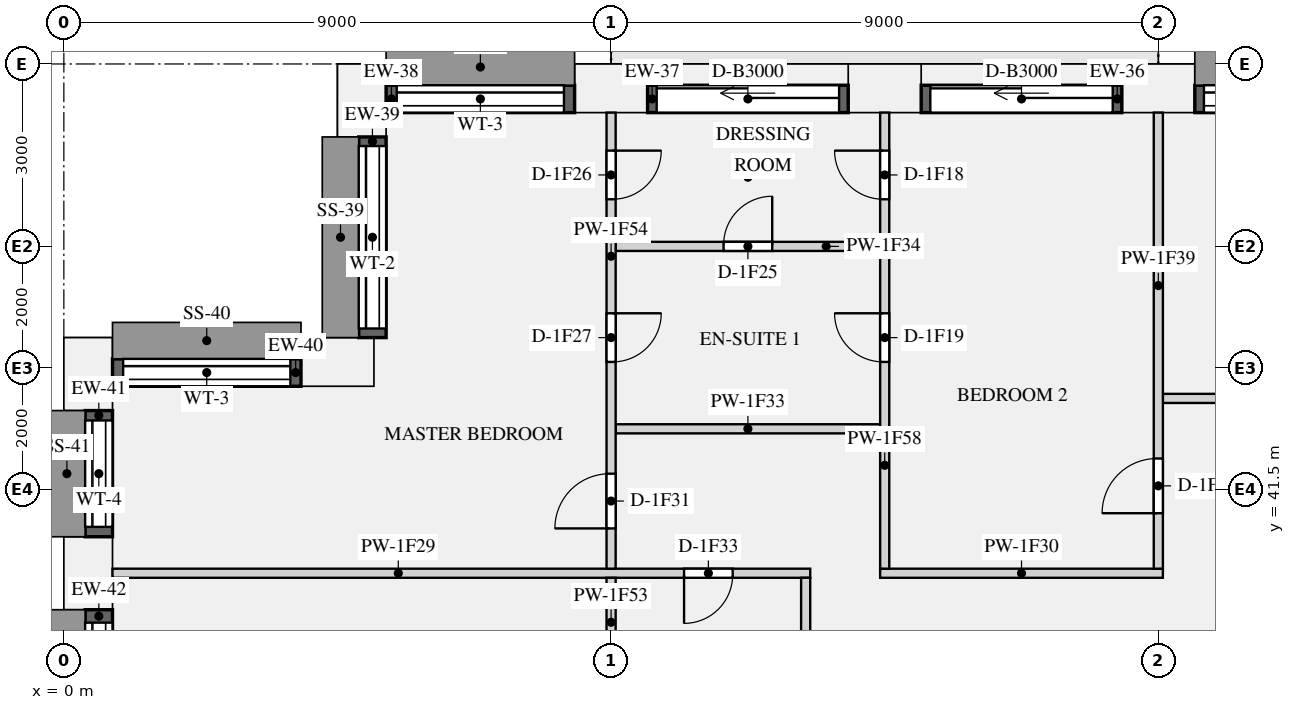
"""IFC4 building model, lengths in metres.
Left out: names, types, materials, properties, quantities, classifications, styles, units other than length and angle.
Written with IfcOpenShell. Run it as: python <this file> out.ifc"""

import sys

from ifc_helpers import new_model, si_unit, direction, frame, frame_2d, origin, origin_2d, place, context, subcontext, project, spatial, rectangle, extrude, element, fill, save


model = new_model("IFC4")
c1 = context("Model", 3, precision=1e-05, world=origin(), true_north=direction((0.0, 1.0)))
c2 = subcontext(c1, "Body", "Model", "MODEL_VIEW")
j1 = project(units=[si_unit("LENGTHUNIT", "METRE"), si_unit("PLANEANGLEUNIT", "RADIAN")], contexts=[c1])
p1 = place(None, origin())
s1 = spatial("IfcSite", under=j1, at=p1, CompositionType="ELEMENT")
p2 = place(p1, origin())
s2 = spatial("IfcBuilding", under=s1, at=p2, CompositionType="ELEMENT")
p3 = place(p2, frame((0.0, 0.0, 60.45)))
s3 = spatial("IfcBuildingStorey", under=s2, at=p3, CompositionType="ELEMENT", Elevation=60.45)
for number, where, z_axis, x_axis in (
    (1, (18.0, 48.1, 0.0), (0.0, 0.0, 1.0), (-1.0, 0.0, 0.0)),
    (2, (13.5, 48.1, 0.0), (0.0, 0.0, 1.0), (-1.0, 0.0, 0.0)),
    (3, (9.0, 48.1, 0.0), (0.0, 0.0, 1.0), (-1.0, 0.0, 0.0)),
    (4, (4.9, 47.9, 0.0), (0.0, 0.0, 1.0), (0.0, -1.0, 0.0)),
    (5, (4.5, 43.6, 0.0), (0.0, 0.0, 1.0), (-1.0, 0.0, 0.0)),
    (6, (0.4, 43.4, 0.0), (0.0, 0.0, 1.0), (0.0, -1.0, 0.0)),
    (7, (0.4, 40.125, 0.0), (0.0, 0.0, 1.0), (0.0, -1.0, 0.0)),
):
    element("IfcColumn", number, at=place(p3, frame(where, z_axis=z_axis, x_axis=x_axis)), inside=s3, PredefinedType="USERDEFINED", context=c2, shape_type="SweptSolid", body=[
        extrude(rectangle(XDim=1.2, YDim=0.8, at=origin_2d()), origin(), (0.0, 0.0, 1.0), 3.15),
    ])
p4 = place(p3, frame((21.9, 47.925, 0.9), z_axis=(0.0, 0.0, 1.0), x_axis=(-1.0, 0.0, 0.0)))
e8 = element("IfcWall", 8, at=p4, inside=s3, PredefinedType="SOLIDWALL", context=c2, shape_type="SweptSolid", body=[
    extrude(rectangle(XDim=3.3, YDim=0.45, at=frame_2d((1.65, 0.0))), origin(), (0.0, 0.0, 1.0), 1.93),
])
p5 = place(p4, frame((0.15, 0.0, 0.15)))
e9 = element("IfcOpeningElement", 9, at=p5, cuts=e8, PredefinedType="OPENING", context=c2, shape_type="SweptSolid", body=[
    extrude(rectangle(XDim=3.0, YDim=1.5, at=frame_2d((1.5, 0.75))), frame((0.0, 0.235, 0.0), z_axis=(0.0, -1.0, 0.0), x_axis=(1.0, 0.0, 0.0)), (0.0, 0.0, 1.0), 0.47),
])
p6 = place(p3, frame((17.4, 47.925, 0.0), z_axis=(0.0, 0.0, 1.0), x_axis=(-1.0, 0.0, 0.0)))
e10 = element("IfcWall", 10, at=p6, inside=s3, PredefinedType="SOLIDWALL", context=c2, shape_type="SweptSolid", body=[
    extrude(rectangle(XDim=3.3, YDim=0.45, at=frame_2d((1.65, 0.0))), origin(), (0.0, 0.0, 1.0), 2.83),
])
p7 = place(p6, frame((0.15, 0.0, 0.0)))
e11 = element("IfcOpeningElement", 11, at=p7, cuts=e10, PredefinedType="OPENING", context=c2, shape_type="SweptSolid", body=[
    extrude(rectangle(XDim=3.0, YDim=2.3, at=frame_2d((1.5, 1.15))), frame((0.0, 0.235, 0.0), z_axis=(0.0, -1.0, 0.0), x_axis=(1.0, 0.0, 0.0)), (0.0, 0.0, 1.0), 0.47),
])
p8 = place(p3, frame((12.9, 47.925, 0.0), z_axis=(0.0, 0.0, 1.0), x_axis=(-1.0, 0.0, 0.0)))
e12 = element("IfcWall", 12, at=p8, inside=s3, PredefinedType="SOLIDWALL", context=c2, shape_type="SweptSolid", body=[
    extrude(rectangle(XDim=3.3, YDim=0.45, at=frame_2d((1.65, 0.0))), origin(), (0.0, 0.0, 1.0), 2.83),
])
p9 = place(p8, frame((0.15, 0.0, 0.0)))
e13 = element("IfcOpeningElement", 13, at=p9, cuts=e12, PredefinedType="OPENING", context=c2, shape_type="SweptSolid", body=[
    extrude(rectangle(XDim=3.0, YDim=2.3, at=frame_2d((1.5, 1.15))), frame((0.0, 0.235, 0.0), z_axis=(0.0, -1.0, 0.0), x_axis=(1.0, 0.0, 0.0)), (0.0, 0.0, 1.0), 0.47),
])
p10 = place(p3, frame((8.4, 47.925, 0.9), z_axis=(0.0, 0.0, 1.0), x_axis=(-1.0, 0.0, 0.0)))
e14 = element("IfcWall", 14, at=p10, inside=s3, PredefinedType="SOLIDWALL", context=c2, shape_type="SweptSolid", body=[
    extrude(rectangle(XDim=3.1, YDim=0.45, at=frame_2d((1.55, 0.0))), origin(), (0.0, 0.0, 1.0), 1.93),
])
p11 = place(p10, frame((0.175, 0.0, 0.15)))
e15 = element("IfcOpeningElement", 15, at=p11, cuts=e14, PredefinedType="OPENING", context=c2, shape_type="SweptSolid", body=[
    extrude(rectangle(XDim=2.75, YDim=1.5, at=frame_2d((1.375, 0.75))), frame((0.0, 0.235, 0.0), z_axis=(0.0, -1.0, 0.0), x_axis=(1.0, 0.0, 0.0)), (0.0, 0.0, 1.0), 0.47),
])
p12 = place(p3, frame((5.075, 47.3, 0.9), z_axis=(0.0, 0.0, 1.0), x_axis=(0.0, -1.0, 0.0)))
e16 = element("IfcWall", 16, at=p12, inside=s3, PredefinedType="SOLIDWALL", context=c2, shape_type="SweptSolid", body=[
    extrude(rectangle(XDim=3.3, YDim=0.45, at=frame_2d((1.65, 0.0))), origin(), (0.0, 0.0, 1.0), 1.93),
])
p13 = place(p12, frame((0.15, 0.0, 0.15)))
e17 = element("IfcOpeningElement", 17, at=p13, cuts=e16, PredefinedType="OPENING", context=c2, shape_type="SweptSolid", body=[
    extrude(rectangle(XDim=3.0, YDim=1.5, at=frame_2d((1.5, 0.75))), frame((0.0, 0.235, 0.0), z_axis=(0.0, -1.0, 0.0), x_axis=(1.0, 0.0, 0.0)), (0.0, 0.0, 1.0), 0.47),
])
p14 = place(p3, frame((3.9, 43.425, 0.9), z_axis=(0.0, 0.0, 1.0), x_axis=(-1.0, 0.0, 0.0)))
e18 = element("IfcWall", 18, at=p14, inside=s3, PredefinedType="SOLIDWALL", context=c2, shape_type="SweptSolid", body=[
    extrude(rectangle(XDim=3.1, YDim=0.45, at=frame_2d((1.55, 0.0))), origin(), (0.0, 0.0, 1.0), 1.93),
])
p15 = place(p14, frame((0.175, 0.0, 0.15)))
e19 = element("IfcOpeningElement", 19, at=p15, cuts=e18, PredefinedType="OPENING", context=c2, shape_type="SweptSolid", body=[
    extrude(rectangle(XDim=2.75, YDim=1.5, at=frame_2d((1.375, 0.75))), frame((0.0, 0.235, 0.0), z_axis=(0.0, -1.0, 0.0), x_axis=(1.0, 0.0, 0.0)), (0.0, 0.0, 1.0), 0.47),
])
p16 = place(p3, frame((0.575, 42.8, 0.9), z_axis=(0.0, 0.0, 1.0), x_axis=(0.0, -1.0, 0.0)))
e20 = element("IfcWall", 20, at=p16, inside=s3, PredefinedType="SOLIDWALL", context=c2, shape_type="SweptSolid", body=[
    extrude(rectangle(XDim=2.075, YDim=0.45, at=frame_2d((1.038, 0.0))), origin(), (0.0, 0.0, 1.0), 1.93),
])
p17 = place(p16, frame((0.163, 0.0, 0.15)))
e21 = element("IfcOpeningElement", 21, at=p17, cuts=e20, PredefinedType="OPENING", context=c2, shape_type="SweptSolid", body=[
    extrude(rectangle(XDim=1.75, YDim=1.5, at=frame_2d((0.875, 0.75))), frame((0.0, 0.235, 0.0), z_axis=(0.0, -1.0, 0.0), x_axis=(1.0, 0.0, 0.0)), (0.0, 0.0, 1.0), 0.47),
])
p18 = place(p3, frame((0.575, 39.525, 0.9), z_axis=(0.0, 0.0, 1.0), x_axis=(0.0, -1.0, 0.0)))
e22 = element("IfcWall", 22, at=p18, inside=s3, PredefinedType="SOLIDWALL", context=c2, shape_type="SweptSolid", body=[
    extrude(rectangle(XDim=2.675, YDim=0.45, at=frame_2d((1.337, 0.0))), origin(), (0.0, 0.0, 1.0), 1.93),
])
p19 = place(p18, frame((0.212, 0.0, 0.15)))
e23 = element("IfcOpeningElement", 23, at=p19, cuts=e22, PredefinedType="OPENING", context=c2, shape_type="SweptSolid", body=[
    extrude(rectangle(XDim=2.25, YDim=1.5, at=frame_2d((1.125, 0.75))), frame((0.0, 0.235, 0.0), z_axis=(0.0, -1.0, 0.0), x_axis=(1.0, 0.0, 0.0)), (0.0, 0.0, 1.0), 0.47),
])
p20 = place(p3, frame((18.075, 43.0, 0.0), z_axis=(0.0, 0.0, 1.0), x_axis=(1.0, 0.0, 0.0)))
e24 = element("IfcWall", 24, at=p20, inside=s3, PredefinedType="PARTITIONING", context=c2, shape_type="SweptSolid", body=[
    extrude(rectangle(XDim=22.325, YDim=0.15, at=frame_2d((11.163, 0.0))), origin(), (0.0, 0.0, 1.0), 2.83),
])
p21 = place(p20, frame((17.175, 0.0, 0.0)))
e25 = element("IfcOpeningElement", 25, at=p21, cuts=e24, PredefinedType="OPENING", context=c2, shape_type="SweptSolid", body=[
    extrude(rectangle(XDim=1.5, YDim=2.1, at=frame_2d((0.75, 1.05))), frame((0.0, 0.085, 0.0), z_axis=(0.0, -1.0, 0.0), x_axis=(1.0, 0.0, 0.0)), (0.0, 0.0, 1.0), 0.17),
])
p22 = place(p20, frame((11.475, 0.0, 0.0)))
e26 = element("IfcOpeningElement", 26, at=p22, cuts=e24, PredefinedType="OPENING", context=c2, shape_type="SweptSolid", body=[
    extrude(rectangle(XDim=0.9, YDim=2.1, at=frame_2d((0.45, 1.05))), frame((0.0, 0.085, 0.0), z_axis=(0.0, -1.0, 0.0), x_axis=(1.0, 0.0, 0.0)), (0.0, 0.0, 1.0), 0.17),
])
p23 = place(p20, frame((2.475, 0.0, 0.0)))
e27 = element("IfcOpeningElement", 27, at=p23, cuts=e24, PredefinedType="OPENING", context=c2, shape_type="SweptSolid", body=[
    extrude(rectangle(XDim=0.9, YDim=2.1, at=frame_2d((0.45, 1.05))), frame((0.0, 0.085, 0.0), z_axis=(0.0, -1.0, 0.0), x_axis=(1.0, 0.0, 0.0)), (0.0, 0.0, 1.0), 0.17),
])
p24 = place(p3, frame((0.8, 40.125, 0.0), z_axis=(0.0, 0.0, 1.0), x_axis=(1.0, 0.0, 0.0)))
e28 = element("IfcWall", 28, at=p24, inside=s3, PredefinedType="PARTITIONING", context=c2, shape_type="SweptSolid", body=[
    extrude(rectangle(XDim=11.475, YDim=0.15, at=frame_2d((5.737, 0.0))), origin(), (0.0, 0.0, 1.0), 2.83),
])
p25 = place(p24, frame((9.4, 0.0, 0.0)))
e29 = element("IfcOpeningElement", 29, at=p25, cuts=e28, PredefinedType="OPENING", context=c2, shape_type="SweptSolid", body=[
    extrude(rectangle(XDim=0.8, YDim=2.1, at=frame_2d((0.4, 1.05))), frame((0.0, 0.085, 0.0), z_axis=(0.0, -1.0, 0.0), x_axis=(1.0, 0.0, 0.0)), (0.0, 0.0, 1.0), 0.17),
])
p26 = place(p3, frame((13.425, 40.125, 0.0), z_axis=(0.0, 0.0, 1.0), x_axis=(1.0, 0.0, 0.0)))
e30 = element("IfcWall", 30, at=p26, inside=s3, PredefinedType="PARTITIONING", context=c2, shape_type="SweptSolid", body=[
    extrude(rectangle(XDim=4.65, YDim=0.15, at=frame_2d((2.325, 0.0))), origin(), (0.0, 0.0, 1.0), 2.83),
])
p27 = place(p3, frame((9.075, 42.5, 0.0), z_axis=(0.0, 0.0, 1.0), x_axis=(1.0, 0.0, 0.0)))
e31 = element("IfcWall", 31, at=p27, inside=s3, PredefinedType="PARTITIONING", context=c2, shape_type="SweptSolid", body=[
    extrude(rectangle(XDim=4.35, YDim=0.15, at=frame_2d((2.175, 0.0))), origin(), (0.0, 0.0, 1.0), 2.83),
])
p28 = place(p3, frame((9.075, 45.5, 0.0), z_axis=(0.0, 0.0, 1.0), x_axis=(1.0, 0.0, 0.0)))
e32 = element("IfcWall", 32, at=p28, inside=s3, PredefinedType="PARTITIONING", context=c2, shape_type="SweptSolid", body=[
    extrude(rectangle(XDim=4.35, YDim=0.15, at=frame_2d((2.175, 0.0))), origin(), (0.0, 0.0, 1.0), 2.83),
])
p29 = place(p28, frame((1.775, 0.0, 0.0)))
e33 = element("IfcOpeningElement", 33, at=p29, cuts=e32, PredefinedType="OPENING", context=c2, shape_type="SweptSolid", body=[
    extrude(rectangle(XDim=0.8, YDim=2.1, at=frame_2d((0.4, 1.05))), frame((0.0, 0.085, 0.0), z_axis=(0.0, -1.0, 0.0), x_axis=(1.0, 0.0, 0.0)), (0.0, 0.0, 1.0), 0.17),
])
p30 = place(p3, frame((18.0, 40.2, 0.0), z_axis=(0.0, 0.0, 1.0), x_axis=(0.0, 1.0, 0.0)))
e34 = element("IfcWall", 34, at=p30, inside=s3, PredefinedType="PARTITIONING", context=c2, shape_type="SweptSolid", body=[
    extrude(rectangle(XDim=7.5, YDim=0.15, at=frame_2d((3.75, 0.0))), origin(), (0.0, 0.0, 1.0), 2.83),
])
p31 = place(p30, frame((0.912, 0.0, 0.0)))
e35 = element("IfcOpeningElement", 35, at=p31, cuts=e34, PredefinedType="OPENING", context=c2, shape_type="SweptSolid", body=[
    extrude(rectangle(XDim=0.9, YDim=2.1, at=frame_2d((0.45, 1.05))), frame((0.0, 0.085, 0.0), z_axis=(0.0, -1.0, 0.0), x_axis=(1.0, 0.0, 0.0)), (0.0, 0.0, 1.0), 0.17),
])
p32 = place(p3, frame((9.0, 36.35, 0.0), z_axis=(0.0, 0.0, 1.0), x_axis=(0.0, 1.0, 0.0)))
e36 = element("IfcWall", 36, at=p32, inside=s3, PredefinedType="PARTITIONING", context=c2, shape_type="SweptSolid", body=[
    extrude(rectangle(XDim=3.7, YDim=0.15, at=frame_2d((1.85, 0.0))), origin(), (0.0, 0.0, 1.0), 2.83),
])
p33 = place(p32, frame((1.438, 0.0, 0.0)))
e37 = element("IfcOpeningElement", 37, at=p33, cuts=e36, PredefinedType="OPENING", context=c2, shape_type="SweptSolid", body=[
    extrude(rectangle(XDim=0.8, YDim=2.1, at=frame_2d((0.4, 1.05))), frame((0.0, 0.085, 0.0), z_axis=(0.0, -1.0, 0.0), x_axis=(1.0, 0.0, 0.0)), (0.0, 0.0, 1.0), 0.17),
])
p34 = place(p3, frame((9.0, 40.2, 0.0), z_axis=(0.0, 0.0, 1.0), x_axis=(0.0, 1.0, 0.0)))
e38 = element("IfcWall", 38, at=p34, inside=s3, PredefinedType="PARTITIONING", context=c2, shape_type="SweptSolid", body=[
    extrude(rectangle(XDim=7.5, YDim=0.15, at=frame_2d((3.75, 0.0))), origin(), (0.0, 0.0, 1.0), 2.83),
])
p35 = place(p34, frame((6.075, 0.0, 0.0)))
e39 = element("IfcOpeningElement", 39, at=p35, cuts=e38, PredefinedType="OPENING", context=c2, shape_type="SweptSolid", body=[
    extrude(rectangle(XDim=0.8, YDim=2.1, at=frame_2d((0.4, 1.05))), frame((0.0, 0.085, 0.0), z_axis=(0.0, -1.0, 0.0), x_axis=(1.0, 0.0, 0.0)), (0.0, 0.0, 1.0), 0.17),
])
p36 = place(p34, frame((3.4, 0.0, 0.0)))
e40 = element("IfcOpeningElement", 40, at=p36, cuts=e38, PredefinedType="OPENING", context=c2, shape_type="SweptSolid", body=[
    extrude(rectangle(XDim=0.8, YDim=2.1, at=frame_2d((0.4, 1.05))), frame((0.0, 0.085, 0.0), z_axis=(0.0, -1.0, 0.0), x_axis=(1.0, 0.0, 0.0)), (0.0, 0.0, 1.0), 0.17),
])
p37 = place(p34, frame((0.662, 0.0, 0.0)))
e41 = element("IfcOpeningElement", 41, at=p37, cuts=e38, PredefinedType="OPENING", context=c2, shape_type="SweptSolid", body=[
    extrude(rectangle(XDim=0.9, YDim=2.1, at=frame_2d((0.45, 1.05))), frame((0.0, 0.085, 0.0), z_axis=(0.0, -1.0, 0.0), x_axis=(1.0, 0.0, 0.0)), (0.0, 0.0, 1.0), 0.17),
])
p38 = place(p3, frame((13.5, 40.2, 0.0), z_axis=(0.0, 0.0, 1.0), x_axis=(0.0, 1.0, 0.0)))
e42 = element("IfcWall", 42, at=p38, inside=s3, PredefinedType="PARTITIONING", context=c2, shape_type="SweptSolid", body=[
    extrude(rectangle(XDim=7.5, YDim=0.15, at=frame_2d((3.75, 0.0))), origin(), (0.0, 0.0, 1.0), 2.83),
])
p39 = place(p38, frame((6.075, 0.0, 0.0)))
e43 = element("IfcOpeningElement", 43, at=p39, cuts=e42, PredefinedType="OPENING", context=c2, shape_type="SweptSolid", body=[
    extrude(rectangle(XDim=0.8, YDim=2.1, at=frame_2d((0.4, 1.05))), frame((0.0, 0.085, 0.0), z_axis=(0.0, -1.0, 0.0), x_axis=(1.0, 0.0, 0.0)), (0.0, 0.0, 1.0), 0.17),
])
p40 = place(p38, frame((3.4, 0.0, 0.0)))
e44 = element("IfcOpeningElement", 44, at=p40, cuts=e42, PredefinedType="OPENING", context=c2, shape_type="SweptSolid", body=[
    extrude(rectangle(XDim=0.8, YDim=2.1, at=frame_2d((0.4, 1.05))), frame((0.0, 0.085, 0.0), z_axis=(0.0, -1.0, 0.0), x_axis=(1.0, 0.0, 0.0)), (0.0, 0.0, 1.0), 0.17),
])
p41 = place(p3, frame((12.2, 36.35, 0.0), z_axis=(0.0, 0.0, 1.0), x_axis=(0.0, 1.0, 0.0)))
e45 = element("IfcWall", 45, at=p41, inside=s3, PredefinedType="PARTITIONING", context=c2, shape_type="SweptSolid", body=[
    extrude(rectangle(XDim=3.7, YDim=0.15, at=frame_2d((1.85, 0.0))), origin(), (0.0, 0.0, 1.0), 2.83),
])
p42 = place(p5, origin())
e46 = element("IfcWindow", 46, at=p42, inside=s3, PartitioningType="SINGLE_PANEL", PredefinedType="WINDOW", context=c2, shape_type="SweptSolid", body=[
    extrude(rectangle(XDim=3.0, YDim=1.5, at=frame_2d((1.5, 0.75))), frame((0.0, -0.065, 0.0), z_axis=(0.0, -1.0, 0.0), x_axis=(1.0, 0.0, 0.0)), (0.0, 0.0, 1.0), 0.06),
])
fill(e9, e46)
p43 = place(p7, origin())
e47 = element("IfcDoor", 47, at=p43, inside=s3, OperationType="SLIDING_TO_LEFT", PredefinedType="DOOR", context=c2, shape_type="SweptSolid", body=[
    extrude(rectangle(XDim=3.0, YDim=2.3, at=frame_2d((1.5, 1.15))), frame((0.0, -0.07, 0.0), z_axis=(0.0, -1.0, 0.0), x_axis=(1.0, 0.0, 0.0)), (0.0, 0.0, 1.0), 0.05),
])
fill(e11, e47)
p44 = place(p9, origin())
e48 = element("IfcDoor", 48, at=p44, inside=s3, OperationType="SLIDING_TO_LEFT", PredefinedType="DOOR", context=c2, shape_type="SweptSolid", body=[
    extrude(rectangle(XDim=3.0, YDim=2.3, at=frame_2d((1.5, 1.15))), frame((0.0, -0.07, 0.0), z_axis=(0.0, -1.0, 0.0), x_axis=(1.0, 0.0, 0.0)), (0.0, 0.0, 1.0), 0.05),
])
fill(e13, e48)
p45 = place(p11, origin())
e49 = element("IfcWindow", 49, at=p45, inside=s3, PartitioningType="SINGLE_PANEL", PredefinedType="WINDOW", context=c2, shape_type="SweptSolid", body=[
    extrude(rectangle(XDim=2.75, YDim=1.5, at=frame_2d((1.375, 0.75))), frame((0.0, -0.065, 0.0), z_axis=(0.0, -1.0, 0.0), x_axis=(1.0, 0.0, 0.0)), (0.0, 0.0, 1.0), 0.06),
])
fill(e15, e49)
p46 = place(p13, origin())
e50 = element("IfcWindow", 50, at=p46, inside=s3, PartitioningType="SINGLE_PANEL", PredefinedType="WINDOW", context=c2, shape_type="SweptSolid", body=[
    extrude(rectangle(XDim=3.0, YDim=1.5, at=frame_2d((1.5, 0.75))), frame((0.0, -0.065, 0.0), z_axis=(0.0, -1.0, 0.0), x_axis=(1.0, 0.0, 0.0)), (0.0, 0.0, 1.0), 0.06),
])
fill(e17, e50)
p47 = place(p15, origin())
e51 = element("IfcWindow", 51, at=p47, inside=s3, PartitioningType="SINGLE_PANEL", PredefinedType="WINDOW", context=c2, shape_type="SweptSolid", body=[
    extrude(rectangle(XDim=2.75, YDim=1.5, at=frame_2d((1.375, 0.75))), frame((0.0, -0.065, 0.0), z_axis=(0.0, -1.0, 0.0), x_axis=(1.0, 0.0, 0.0)), (0.0, 0.0, 1.0), 0.06),
])
fill(e19, e51)
p48 = place(p17, origin())
e52 = element("IfcWindow", 52, at=p48, inside=s3, PartitioningType="SINGLE_PANEL", PredefinedType="WINDOW", context=c2, shape_type="SweptSolid", body=[
    extrude(rectangle(XDim=1.75, YDim=1.5, at=frame_2d((0.875, 0.75))), frame((0.0, -0.065, 0.0), z_axis=(0.0, -1.0, 0.0), x_axis=(1.0, 0.0, 0.0)), (0.0, 0.0, 1.0), 0.06),
])
fill(e21, e52)
p49 = place(p19, origin())
e53 = element("IfcWindow", 53, at=p49, inside=s3, PartitioningType="SINGLE_PANEL", PredefinedType="WINDOW", context=c2, shape_type="SweptSolid", body=[
    extrude(rectangle(XDim=2.25, YDim=1.5, at=frame_2d((1.125, 0.75))), frame((0.0, -0.065, 0.0), z_axis=(0.0, -1.0, 0.0), x_axis=(1.0, 0.0, 0.0)), (0.0, 0.0, 1.0), 0.06),
])
fill(e23, e53)
p50 = place(p39, origin())
e54 = element("IfcDoor", 54, at=p50, inside=s3, OperationType="SINGLE_SWING_RIGHT", PredefinedType="DOOR", context=c2, shape_type="SweptSolid", body=[
    extrude(rectangle(XDim=0.8, YDim=2.1, at=frame_2d((0.4, 1.05))), frame((0.0, 0.025, 0.0), z_axis=(0.0, -1.0, 0.0), x_axis=(1.0, 0.0, 0.0)), (0.0, 0.0, 1.0), 0.05),
])
fill(e43, e54)
p51 = place(p40, origin())
e55 = element("IfcDoor", 55, at=p51, inside=s3, OperationType="SINGLE_SWING_RIGHT", PredefinedType="DOOR", context=c2, shape_type="SweptSolid", body=[
    extrude(rectangle(XDim=0.8, YDim=2.1, at=frame_2d((0.4, 1.05))), frame((0.0, 0.025, 0.0), z_axis=(0.0, -1.0, 0.0), x_axis=(1.0, 0.0, 0.0)), (0.0, 0.0, 1.0), 0.05),
])
fill(e44, e55)
p52 = place(p31, origin())
e56 = element("IfcDoor", 56, at=p52, inside=s3, OperationType="SINGLE_SWING_LEFT", PredefinedType="DOOR", context=c2, shape_type="SweptSolid", body=[
    extrude(rectangle(XDim=0.9, YDim=2.1, at=frame_2d((0.45, 1.05))), frame((0.0, 0.025, 0.0), z_axis=(0.0, -1.0, 0.0), x_axis=(1.0, 0.0, 0.0)), (0.0, 0.0, 1.0), 0.05),
])
fill(e35, e56)
p53 = place(p29, origin())
e57 = element("IfcDoor", 57, at=p53, inside=s3, OperationType="SINGLE_SWING_RIGHT", PredefinedType="DOOR", context=c2, shape_type="SweptSolid", body=[
    extrude(rectangle(XDim=0.8, YDim=2.1, at=frame_2d((0.4, 1.05))), frame((0.0, 0.025, 0.0), z_axis=(0.0, -1.0, 0.0), x_axis=(1.0, 0.0, 0.0)), (0.0, 0.0, 1.0), 0.05),
])
fill(e33, e57)
p54 = place(p35, frame((0.8, 0.0, 0.0), z_axis=(0.0, 0.0, 1.0), x_axis=(-1.0, 0.0, 0.0)))
e58 = element("IfcDoor", 58, at=p54, inside=s3, OperationType="SINGLE_SWING_LEFT", PredefinedType="DOOR", context=c2, shape_type="SweptSolid", body=[
    extrude(rectangle(XDim=0.8, YDim=2.1, at=frame_2d((0.4, 1.05))), frame((0.0, 0.025, 0.0), z_axis=(0.0, -1.0, 0.0), x_axis=(1.0, 0.0, 0.0)), (0.0, 0.0, 1.0), 0.05),
])
fill(e39, e58)
p55 = place(p36, frame((0.8, 0.0, 0.0), z_axis=(0.0, 0.0, 1.0), x_axis=(-1.0, 0.0, 0.0)))
e59 = element("IfcDoor", 59, at=p55, inside=s3, OperationType="SINGLE_SWING_LEFT", PredefinedType="DOOR", context=c2, shape_type="SweptSolid", body=[
    extrude(rectangle(XDim=0.8, YDim=2.1, at=frame_2d((0.4, 1.05))), frame((0.0, 0.025, 0.0), z_axis=(0.0, -1.0, 0.0), x_axis=(1.0, 0.0, 0.0)), (0.0, 0.0, 1.0), 0.05),
])
fill(e40, e59)
p56 = place(p37, origin())
e60 = element("IfcDoor", 60, at=p56, inside=s3, OperationType="SINGLE_SWING_LEFT", PredefinedType="DOOR", context=c2, shape_type="SweptSolid", body=[
    extrude(rectangle(XDim=0.9, YDim=2.1, at=frame_2d((0.45, 1.05))), frame((0.0, 0.025, 0.0), z_axis=(0.0, -1.0, 0.0), x_axis=(1.0, 0.0, 0.0)), (0.0, 0.0, 1.0), 0.05),
])
fill(e41, e60)
p57 = place(p25, frame((0.8, 0.0, 0.0), z_axis=(0.0, 0.0, 1.0), x_axis=(-1.0, 0.0, 0.0)))
e61 = element("IfcDoor", 61, at=p57, inside=s3, OperationType="SINGLE_SWING_RIGHT", PredefinedType="DOOR", context=c2, shape_type="SweptSolid", body=[
    extrude(rectangle(XDim=0.8, YDim=2.1, at=frame_2d((0.4, 1.05))), frame((0.0, 0.025, 0.0), z_axis=(0.0, -1.0, 0.0), x_axis=(1.0, 0.0, 0.0)), (0.0, 0.0, 1.0), 0.05),
])
fill(e29, e61)
save(model, sys.argv[1])
